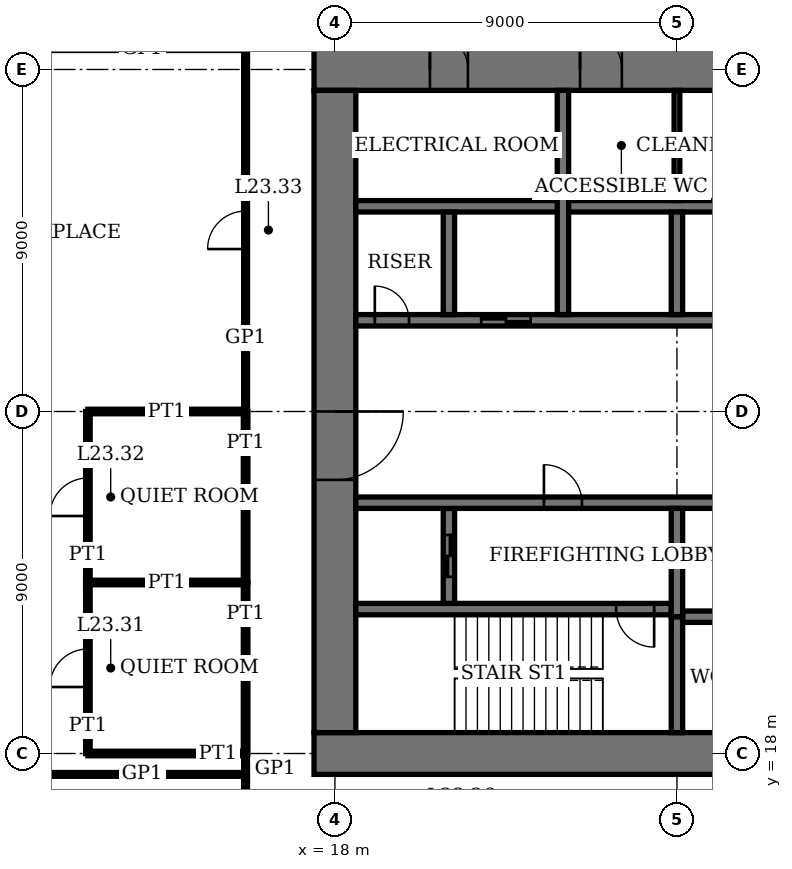
"""IFC4 building model, lengths in metres.
Left out: names, types, materials, properties, quantities, classifications, styles, units other than length and angle.
Written with IfcOpenShell. Run it as: python <this file> out.ifc"""

import sys

from ifc_helpers import new_model, si_unit, direction, frame, frame_2d, origin, place, context, subcontext, project, spatial, rectangle, extrude, element, fill, save


model = new_model("IFC4")
c1 = context("Model", 3, precision=1e-05, world=origin(), true_north=direction((0.0, 1.0)))
c2 = subcontext(c1, "Body", "Model", "MODEL_VIEW")
j1 = project(units=[si_unit("LENGTHUNIT", "METRE"), si_unit("PLANEANGLEUNIT", "RADIAN")], contexts=[c1])
p1 = place(None, origin())
s1 = spatial("IfcSite", under=j1, at=p1, CompositionType="ELEMENT")
p2 = place(p1, origin())
s2 = spatial("IfcBuilding", under=s1, at=p2, CompositionType="ELEMENT")
p3 = place(p2, frame((0.0, 0.0, 97.0)))
s3 = spatial("IfcBuildingStorey", under=s2, at=p3, CompositionType="ELEMENT", Elevation=97.0)
p4 = place(p3, frame((17.45, 18.0, 0.0), z_axis=(0.0, 0.0, 1.0), x_axis=(1.0, 0.0, 0.0)))
e1 = element("IfcWall", 1, at=p4, inside=s3, PredefinedType="SHEAR", context=c2, shape_type="SweptSolid", body=[
    extrude(rectangle(XDim=28.1, YDim=1.1, at=frame_2d((14.05, 0.0))), origin(), (0.0, 0.0, 1.0), 4.0),
])
p5 = place(p4, frame((11.55, 0.0, 0.0)))
e2 = element("IfcOpeningElement", 2, at=p5, cuts=e1, PredefinedType="OPENING", context=c2, shape_type="SweptSolid", body=[
    extrude(rectangle(XDim=1.0, YDim=2.4, at=frame_2d((0.5, 1.2))), frame((0.0, 0.56, 0.0), z_axis=(0.0, -1.0, 0.0), x_axis=(1.0, 0.0, 0.0)), (0.0, 0.0, 1.0), 1.12),
])
p6 = place(p4, frame((16.55, 0.0, 0.0)))
e3 = element("IfcOpeningElement", 3, at=p6, cuts=e1, PredefinedType="OPENING", context=c2, shape_type="SweptSolid", body=[
    extrude(rectangle(XDim=1.0, YDim=2.4, at=frame_2d((0.5, 1.2))), frame((0.0, 0.56, 0.0), z_axis=(0.0, -1.0, 0.0), x_axis=(1.0, 0.0, 0.0)), (0.0, 0.0, 1.0), 1.12),
])
p7 = place(p4, frame((20.0, 0.0, 0.0)))
e4 = element("IfcOpeningElement", 4, at=p7, cuts=e1, PredefinedType="OPENING", context=c2, shape_type="SweptSolid", body=[
    extrude(rectangle(XDim=1.1, YDim=2.4, at=frame_2d((0.55, 1.2))), frame((0.0, 0.56, 0.0), z_axis=(0.0, -1.0, 0.0), x_axis=(1.0, 0.0, 0.0)), (0.0, 0.0, 1.0), 1.12),
])
p8 = place(p4, frame((24.05, 0.0, 0.0)))
e5 = element("IfcOpeningElement", 5, at=p8, cuts=e1, PredefinedType="OPENING", context=c2, shape_type="SweptSolid", body=[
    extrude(rectangle(XDim=1.0, YDim=2.4, at=frame_2d((0.5, 1.2))), frame((0.0, 0.56, 0.0), z_axis=(0.0, -1.0, 0.0), x_axis=(1.0, 0.0, 0.0)), (0.0, 0.0, 1.0), 1.12),
])
p9 = place(p3, frame((45.55, 36.0, 0.0), z_axis=(0.0, 0.0, 1.0), x_axis=(-1.0, 0.0, 0.0)))
e6 = element("IfcWall", 6, at=p9, inside=s3, PredefinedType="SHEAR", context=c2, shape_type="SweptSolid", body=[
    extrude(rectangle(XDim=28.1, YDim=1.1, at=frame_2d((14.05, 0.0))), origin(), (0.0, 0.0, 1.0), 4.0),
])
p10 = place(p9, frame((11.55, 0.0, 0.0)))
e7 = element("IfcOpeningElement", 7, at=p10, cuts=e6, PredefinedType="OPENING", context=c2, shape_type="SweptSolid", body=[
    extrude(rectangle(XDim=1.0, YDim=2.4, at=frame_2d((0.5, 1.2))), frame((0.0, 0.56, 0.0), z_axis=(0.0, -1.0, 0.0), x_axis=(1.0, 0.0, 0.0)), (0.0, 0.0, 1.0), 1.12),
])
p11 = place(p9, frame((16.55, 0.0, 0.0)))
e8 = element("IfcOpeningElement", 8, at=p11, cuts=e6, PredefinedType="OPENING", context=c2, shape_type="SweptSolid", body=[
    extrude(rectangle(XDim=1.0, YDim=2.4, at=frame_2d((0.5, 1.2))), frame((0.0, 0.56, 0.0), z_axis=(0.0, -1.0, 0.0), x_axis=(1.0, 0.0, 0.0)), (0.0, 0.0, 1.0), 1.12),
])
p12 = place(p9, frame((20.0, 0.0, 0.0)))
e9 = element("IfcOpeningElement", 9, at=p12, cuts=e6, PredefinedType="OPENING", context=c2, shape_type="SweptSolid", body=[
    extrude(rectangle(XDim=1.1, YDim=2.4, at=frame_2d((0.55, 1.2))), frame((0.0, 0.56, 0.0), z_axis=(0.0, -1.0, 0.0), x_axis=(1.0, 0.0, 0.0)), (0.0, 0.0, 1.0), 1.12),
])
p13 = place(p9, frame((24.05, 0.0, 0.0)))
e10 = element("IfcOpeningElement", 10, at=p13, cuts=e6, PredefinedType="OPENING", context=c2, shape_type="SweptSolid", body=[
    extrude(rectangle(XDim=1.0, YDim=2.4, at=frame_2d((0.5, 1.2))), frame((0.0, 0.56, 0.0), z_axis=(0.0, -1.0, 0.0), x_axis=(1.0, 0.0, 0.0)), (0.0, 0.0, 1.0), 1.12),
])
p14 = place(p3, frame((18.0, 35.45, 0.0), z_axis=(0.0, 0.0, 1.0), x_axis=(0.0, -1.0, 0.0)))
e11 = element("IfcWall", 11, at=p14, inside=s3, PredefinedType="SHEAR", context=c2, shape_type="SweptSolid", body=[
    extrude(rectangle(XDim=16.9, YDim=1.1, at=frame_2d((8.45, 0.0))), origin(), (0.0, 0.0, 1.0), 4.0),
])
p15 = place(p14, frame((8.45, 0.0, 0.0)))
e12 = element("IfcOpeningElement", 12, at=p15, cuts=e11, PredefinedType="OPENING", context=c2, shape_type="SweptSolid", body=[
    extrude(rectangle(XDim=1.8, YDim=2.4, at=frame_2d((0.9, 1.2))), frame((0.0, 0.56, 0.0), z_axis=(0.0, -1.0, 0.0), x_axis=(1.0, 0.0, 0.0)), (0.0, 0.0, 1.0), 1.12),
])
p16 = place(p3, frame((18.55, 21.8, 0.0), z_axis=(0.0, 0.0, 1.0), x_axis=(1.0, 0.0, 0.0)))
e13 = element("IfcWall", 13, at=p16, inside=s3, PredefinedType="SHEAR", context=c2, shape_type="SweptSolid", body=[
    extrude(rectangle(XDim=8.3, YDim=0.3, at=frame_2d((4.15, 0.0))), origin(), (0.0, 0.0, 1.0), 4.0),
])
p17 = place(p16, frame((6.85, 0.0, 0.0)))
e14 = element("IfcOpeningElement", 14, at=p17, cuts=e13, PredefinedType="OPENING", context=c2, shape_type="SweptSolid", body=[
    extrude(rectangle(XDim=1.0, YDim=2.4, at=frame_2d((0.5, 1.2))), frame((0.0, 0.16, 0.0), z_axis=(0.0, -1.0, 0.0), x_axis=(1.0, 0.0, 0.0)), (0.0, 0.0, 1.0), 0.32),
])
p18 = place(p3, frame((27.0, 18.55, 0.0), z_axis=(0.0, 0.0, 1.0), x_axis=(0.0, 1.0, 0.0)))
e15 = element("IfcWall", 15, at=p18, inside=s3, PredefinedType="SHEAR", context=c2, shape_type="SweptSolid", body=[
    extrude(rectangle(XDim=3.05, YDim=0.3, at=frame_2d((1.525, 0.0))), origin(), (0.0, 0.0, 1.0), 4.0),
])
p19 = place(p3, frame((21.0, 21.95, 0.0), z_axis=(0.0, 0.0, 1.0), x_axis=(0.0, 1.0, 0.0)))
e16 = element("IfcWall", 16, at=p19, inside=s3, PredefinedType="SHEAR", context=c2, shape_type="SweptSolid", body=[
    extrude(rectangle(XDim=2.5, YDim=0.3, at=frame_2d((1.25, 0.0))), origin(), (0.0, 0.0, 1.0), 4.0),
])
p20 = place(p19, frame((0.7, 0.0, 0.0)))
e17 = element("IfcOpeningElement", 17, at=p20, cuts=e16, PredefinedType="OPENING", context=c2, shape_type="SweptSolid", body=[
    extrude(rectangle(XDim=1.1, YDim=2.4, at=frame_2d((0.55, 1.2))), frame((0.0, 0.16, 0.0), z_axis=(0.0, -1.0, 0.0), x_axis=(1.0, 0.0, 0.0)), (0.0, 0.0, 1.0), 0.32),
])
p21 = place(p3, frame((18.55, 24.6, 0.0), z_axis=(0.0, 0.0, 1.0), x_axis=(1.0, 0.0, 0.0)))
e18 = element("IfcWall", 18, at=p21, inside=s3, PredefinedType="SHEAR", context=c2, shape_type="SweptSolid", body=[
    extrude(rectangle(XDim=25.9, YDim=0.3, at=frame_2d((12.95, 0.0))), origin(), (0.0, 0.0, 1.0), 4.0),
])
p22 = place(p21, frame((4.95, 0.0, 0.0)))
e19 = element("IfcOpeningElement", 19, at=p22, cuts=e18, PredefinedType="OPENING", context=c2, shape_type="SweptSolid", body=[
    extrude(rectangle(XDim=1.0, YDim=2.4, at=frame_2d((0.5, 1.2))), frame((0.0, 0.16, 0.0), z_axis=(0.0, -1.0, 0.0), x_axis=(1.0, 0.0, 0.0)), (0.0, 0.0, 1.0), 0.32),
])
p23 = place(p21, frame((24.5, 0.0, 0.0)))
e20 = element("IfcOpeningElement", 20, at=p23, cuts=e18, PredefinedType="OPENING", context=c2, shape_type="SweptSolid", body=[
    extrude(rectangle(XDim=0.9, YDim=2.1, at=frame_2d((0.45, 1.05))), frame((0.0, 0.16, 0.0), z_axis=(0.0, -1.0, 0.0), x_axis=(1.0, 0.0, 0.0)), (0.0, 0.0, 1.0), 0.32),
])
p24 = place(p21, frame((21.3, 0.0, 0.0)))
e21 = element("IfcOpeningElement", 21, at=p24, cuts=e18, PredefinedType="OPENING", context=c2, shape_type="SweptSolid", body=[
    extrude(rectangle(XDim=1.3, YDim=2.4, at=frame_2d((0.65, 1.2))), frame((0.0, 0.16, 0.0), z_axis=(0.0, -1.0, 0.0), x_axis=(1.0, 0.0, 0.0)), (0.0, 0.0, 1.0), 0.32),
])
p25 = place(p3, frame((18.55, 29.4, 0.0), z_axis=(0.0, 0.0, 1.0), x_axis=(1.0, 0.0, 0.0)))
e22 = element("IfcWall", 22, at=p25, inside=s3, PredefinedType="SHEAR", context=c2, shape_type="SweptSolid", body=[
    extrude(rectangle(XDim=25.9, YDim=0.3, at=frame_2d((12.95, 0.0))), origin(), (0.0, 0.0, 1.0), 4.0),
])
p26 = place(p25, frame((19.95, 0.0, 0.0)))
e23 = element("IfcOpeningElement", 23, at=p26, cuts=e22, PredefinedType="OPENING", context=c2, shape_type="SweptSolid", body=[
    extrude(rectangle(XDim=1.0, YDim=2.4, at=frame_2d((0.5, 1.2))), frame((0.0, 0.16, 0.0), z_axis=(0.0, -1.0, 0.0), x_axis=(1.0, 0.0, 0.0)), (0.0, 0.0, 1.0), 0.32),
])
p27 = place(p25, frame((0.5, 0.0, 0.0)))
e24 = element("IfcOpeningElement", 24, at=p27, cuts=e22, PredefinedType="OPENING", context=c2, shape_type="SweptSolid", body=[
    extrude(rectangle(XDim=0.9, YDim=2.1, at=frame_2d((0.45, 1.05))), frame((0.0, 0.16, 0.0), z_axis=(0.0, -1.0, 0.0), x_axis=(1.0, 0.0, 0.0)), (0.0, 0.0, 1.0), 0.32),
])
p28 = place(p25, frame((15.4, 0.0, 0.0)))
e25 = element("IfcOpeningElement", 25, at=p28, cuts=e22, PredefinedType="OPENING", context=c2, shape_type="SweptSolid", body=[
    extrude(rectangle(XDim=1.1, YDim=2.4, at=frame_2d((0.55, 1.2))), frame((0.0, 0.16, 0.0), z_axis=(0.0, -1.0, 0.0), x_axis=(1.0, 0.0, 0.0)), (0.0, 0.0, 1.0), 0.32),
])
p29 = place(p25, frame((12.4, 0.0, 0.0)))
e26 = element("IfcOpeningElement", 26, at=p29, cuts=e22, PredefinedType="OPENING", context=c2, shape_type="SweptSolid", body=[
    extrude(rectangle(XDim=1.1, YDim=2.4, at=frame_2d((0.55, 1.2))), frame((0.0, 0.16, 0.0), z_axis=(0.0, -1.0, 0.0), x_axis=(1.0, 0.0, 0.0)), (0.0, 0.0, 1.0), 0.32),
])
p30 = place(p25, frame((3.3, 0.0, 0.0)))
e27 = element("IfcOpeningElement", 27, at=p30, cuts=e22, PredefinedType="OPENING", context=c2, shape_type="SweptSolid", body=[
    extrude(rectangle(XDim=1.3, YDim=2.4, at=frame_2d((0.65, 1.2))), frame((0.0, 0.16, 0.0), z_axis=(0.0, -1.0, 0.0), x_axis=(1.0, 0.0, 0.0)), (0.0, 0.0, 1.0), 0.32),
])
for number, where, z_axis, x_axis in (
    (28, (27.15, 21.6, 0.0), (0.0, 0.0, 1.0), (1.0, 0.0, 0.0)),
    (29, (18.55, 32.4, 0.0), (0.0, 0.0, 1.0), (1.0, 0.0, 0.0)),
):
    element("IfcWall", number, at=place(p3, frame(where, z_axis=z_axis, x_axis=x_axis)), inside=s3, PredefinedType="SHEAR", context=c2, shape_type="SweptSolid", body=[
        extrude(rectangle(XDim=17.3, YDim=0.3, at=frame_2d((8.65, 0.0))), origin(), (0.0, 0.0, 1.0), 4.0),
    ])
p31 = place(p3, frame((27.0, 29.55, 0.0), z_axis=(0.0, 0.0, 1.0), x_axis=(0.0, 1.0, 0.0)))
e30 = element("IfcWall", 30, at=p31, inside=s3, PredefinedType="SHEAR", context=c2, shape_type="SweptSolid", body=[
    extrude(rectangle(XDim=2.7, YDim=0.3, at=frame_2d((1.35, 0.0))), origin(), (0.0, 0.0, 1.0), 4.0),
])
p32 = place(p3, frame((24.0, 29.55, 0.0), z_axis=(0.0, 0.0, 1.0), x_axis=(0.0, 1.0, 0.0)))
e31 = element("IfcWall", 31, at=p32, inside=s3, PredefinedType="SHEAR", context=c2, shape_type="SweptSolid", body=[
    extrude(rectangle(XDim=5.9, YDim=0.3, at=frame_2d((2.95, 0.0))), origin(), (0.0, 0.0, 1.0), 4.0),
])
p33 = place(p3, frame((21.0, 29.55, 0.0), z_axis=(0.0, 0.0, 1.0), x_axis=(0.0, 1.0, 0.0)))
e32 = element("IfcWall", 32, at=p33, inside=s3, PredefinedType="SHEAR", context=c2, shape_type="SweptSolid", body=[
    extrude(rectangle(XDim=2.7, YDim=0.3, at=frame_2d((1.35, 0.0))), origin(), (0.0, 0.0, 1.0), 4.0),
])
p34 = place(p3, frame((27.0, 21.6, 0.0), z_axis=(0.0, 0.0, 1.0), x_axis=(0.0, 1.0, 0.0)))
e33 = element("IfcWall", 33, at=p34, inside=s3, PredefinedType="SHEAR", context=c2, shape_type="SweptSolid", body=[
    extrude(rectangle(XDim=2.85, YDim=0.3, at=frame_2d((1.425, 0.0))), origin(), (0.0, 0.0, 1.0), 4.0),
])
p35 = place(p3, frame((10.0, 17.45, 0.0), z_axis=(0.0, 0.0, 1.0), x_axis=(1.0, 0.0, 0.0)))
e34 = element("IfcWall", 34, at=p35, inside=s3, PredefinedType="PARTITIONING", context=c2, shape_type="SweptSolid", body=[
    extrude(rectangle(XDim=5.65, YDim=0.1, at=frame_2d((2.825, 0.0))), origin(), (0.0, 0.0, 1.0), 3.75),
])
p36 = place(p3, frame((11.5, 18.0, 0.0), z_axis=(0.0, 0.0, 1.0), x_axis=(1.0, 0.0, 0.0)))
e35 = element("IfcWall", 35, at=p36, inside=s3, PredefinedType="PARTITIONING", context=c2, shape_type="SweptSolid", body=[
    extrude(rectangle(XDim=4.15, YDim=0.12, at=frame_2d((2.075, 0.0))), origin(), (0.0, 0.0, 1.0), 3.05),
])
p37 = place(p3, frame((11.5, 22.5, 0.0), z_axis=(0.0, 0.0, 1.0), x_axis=(1.0, 0.0, 0.0)))
e36 = element("IfcWall", 36, at=p37, inside=s3, PredefinedType="PARTITIONING", context=c2, shape_type="SweptSolid", body=[
    extrude(rectangle(XDim=4.15, YDim=0.12, at=frame_2d((2.075, 0.0))), origin(), (0.0, 0.0, 1.0), 3.1),
])
p38 = place(p3, frame((11.5, 27.0, 0.0), z_axis=(0.0, 0.0, 1.0), x_axis=(1.0, 0.0, 0.0)))
e37 = element("IfcWall", 37, at=p38, inside=s3, PredefinedType="PARTITIONING", context=c2, shape_type="SweptSolid", body=[
    extrude(rectangle(XDim=4.15, YDim=0.12, at=frame_2d((2.075, 0.0))), origin(), (0.0, 0.0, 1.0), 3.05),
])
p39 = place(p3, frame((11.5, 18.0, 0.0), z_axis=(0.0, 0.0, 1.0), x_axis=(0.0, 1.0, 0.0)))
e38 = element("IfcWall", 38, at=p39, inside=s3, PredefinedType="PARTITIONING", context=c2, shape_type="SweptSolid", body=[
    extrude(rectangle(XDim=4.5, YDim=0.12, at=frame_2d((2.25, 0.0))), origin(), (0.0, 0.0, 1.0), 3.75),
])
p40 = place(p39, frame((1.75, 0.0, 0.0)))
e39 = element("IfcOpeningElement", 39, at=p40, cuts=e38, PredefinedType="OPENING", context=c2, shape_type="SweptSolid", body=[
    extrude(rectangle(XDim=1.0, YDim=2.4, at=frame_2d((0.5, 1.2))), frame((0.0, 0.07, 0.0), z_axis=(0.0, -1.0, 0.0), x_axis=(1.0, 0.0, 0.0)), (0.0, 0.0, 1.0), 0.14),
])
p41 = place(p3, frame((11.5, 22.5, 0.0), z_axis=(0.0, 0.0, 1.0), x_axis=(0.0, 1.0, 0.0)))
e40 = element("IfcWall", 40, at=p41, inside=s3, PredefinedType="PARTITIONING", context=c2, shape_type="SweptSolid", body=[
    extrude(rectangle(XDim=4.5, YDim=0.12, at=frame_2d((2.25, 0.0))), origin(), (0.0, 0.0, 1.0), 3.75),
])
p42 = place(p41, frame((1.75, 0.0, 0.0)))
e41 = element("IfcOpeningElement", 41, at=p42, cuts=e40, PredefinedType="OPENING", context=c2, shape_type="SweptSolid", body=[
    extrude(rectangle(XDim=1.0, YDim=2.4, at=frame_2d((0.5, 1.2))), frame((0.0, 0.07, 0.0), z_axis=(0.0, -1.0, 0.0), x_axis=(1.0, 0.0, 0.0)), (0.0, 0.0, 1.0), 0.14),
])
for number, where, z_axis, x_axis in (
    (42, (15.65, 18.0, 0.0), (0.0, 0.0, 1.0), (0.0, 1.0, 0.0)),
    (43, (15.65, 22.5, 0.0), (0.0, 0.0, 1.0), (0.0, 1.0, 0.0)),
):
    element("IfcWall", number, at=place(p3, frame(where, z_axis=z_axis, x_axis=x_axis)), inside=s3, PredefinedType="PARTITIONING", context=c2, shape_type="SweptSolid", body=[
        extrude(rectangle(XDim=4.5, YDim=0.12, at=frame_2d((2.25, 0.0))), origin(), (0.0, 0.0, 1.0), 3.75),
    ])
p43 = place(p3, frame((15.65, 15.65, 0.0), z_axis=(0.0, 0.0, 1.0), x_axis=(0.0, 1.0, 0.0)))
e44 = element("IfcWall", 44, at=p43, inside=s3, PredefinedType="PARTITIONING", context=c2, shape_type="SweptSolid", body=[
    extrude(rectangle(XDim=2.35, YDim=0.1, at=frame_2d((1.175, 0.0))), origin(), (0.0, 0.0, 1.0), 3.75),
])
p44 = place(p3, frame((15.65, 27.0, 0.0), z_axis=(0.0, 0.0, 1.0), x_axis=(0.0, 1.0, 0.0)))
e45 = element("IfcWall", 45, at=p44, inside=s3, PredefinedType="PARTITIONING", context=c2, shape_type="SweptSolid", body=[
    extrude(rectangle(XDim=9.55, YDim=0.1, at=frame_2d((4.775, 0.0))), origin(), (0.0, 0.0, 1.0), 3.75),
])
p45 = place(p44, frame((4.275, 0.0, 0.0)))
e46 = element("IfcOpeningElement", 46, at=p45, cuts=e45, PredefinedType="OPENING", context=c2, shape_type="SweptSolid", body=[
    extrude(rectangle(XDim=1.0, YDim=2.4, at=frame_2d((0.5, 1.2))), frame((0.0, 0.06, 0.0), z_axis=(0.0, -1.0, 0.0), x_axis=(1.0, 0.0, 0.0)), (0.0, 0.0, 1.0), 0.12),
])
p46 = place(p3, frame((27.0, 32.55, 0.0), z_axis=(0.0, 0.0, 1.0), x_axis=(0.0, 1.0, 0.0)))
e47 = element("IfcWall", 47, at=p46, inside=s3, PredefinedType="PARTITIONING", context=c2, shape_type="SweptSolid", body=[
    extrude(rectangle(XDim=2.9, YDim=0.15, at=frame_2d((1.45, 0.0))), origin(), (0.0, 0.0, 1.0), 3.75),
])
p47 = place(p15, origin())
e48 = element("IfcDoor", 48, at=p47, inside=s3, OperationType="DOUBLE_DOOR_DOUBLE_SWING", PredefinedType="DOOR", context=c2, shape_type="SweptSolid", body=[
    extrude(rectangle(XDim=1.8, YDim=2.4, at=frame_2d((0.9, 1.2))), frame((0.0, 0.03, 0.0), z_axis=(0.0, -1.0, 0.0), x_axis=(1.0, 0.0, 0.0)), (0.0, 0.0, 1.0), 0.06),
    extrude(rectangle(XDim=0.04, YDim=2.4, at=frame_2d((0.02, 1.2))), frame((0.0, 0.55, 0.0), z_axis=(0.0, -1.0, 0.0), x_axis=(1.0, 0.0, 0.0)), (0.0, 0.0, 1.0), 1.1),
    extrude(rectangle(XDim=0.04, YDim=2.4, at=frame_2d((1.78, 1.2))), frame((0.0, 0.55, 0.0), z_axis=(0.0, -1.0, 0.0), x_axis=(1.0, 0.0, 0.0)), (0.0, 0.0, 1.0), 1.1),
    extrude(rectangle(XDim=1.8, YDim=0.04, at=frame_2d((0.9, 2.38))), frame((0.0, 0.55, 0.0), z_axis=(0.0, -1.0, 0.0), x_axis=(1.0, 0.0, 0.0)), (0.0, 0.0, 1.0), 1.1),
])
fill(e12, e48)
p48 = place(p12, origin())
e49 = element("IfcDoor", 49, at=p48, inside=s3, OperationType="SINGLE_SWING_RIGHT", PredefinedType="DOOR", context=c2, shape_type="SweptSolid", body=[
    extrude(rectangle(XDim=1.1, YDim=2.4, at=frame_2d((0.55, 1.2))), frame((0.0, 0.025, 0.0), z_axis=(0.0, -1.0, 0.0), x_axis=(1.0, 0.0, 0.0)), (0.0, 0.0, 1.0), 0.05),
    extrude(rectangle(XDim=0.04, YDim=2.4, at=frame_2d((0.02, 1.2))), frame((0.0, 0.44, 0.0), z_axis=(0.0, -1.0, 0.0), x_axis=(1.0, 0.0, 0.0)), (0.0, 0.0, 1.0), 0.88),
    extrude(rectangle(XDim=0.04, YDim=2.4, at=frame_2d((1.08, 1.2))), frame((0.0, 0.44, 0.0), z_axis=(0.0, -1.0, 0.0), x_axis=(1.0, 0.0, 0.0)), (0.0, 0.0, 1.0), 0.88),
    extrude(rectangle(XDim=1.1, YDim=0.04, at=frame_2d((0.55, 2.38))), frame((0.0, 0.44, 0.0), z_axis=(0.0, -1.0, 0.0), x_axis=(1.0, 0.0, 0.0)), (0.0, 0.0, 1.0), 0.88),
])
fill(e9, e49)
p49 = place(p13, origin())
e50 = element("IfcDoor", 50, at=p49, inside=s3, OperationType="SINGLE_SWING_RIGHT", PredefinedType="DOOR", context=c2, shape_type="SweptSolid", body=[
    extrude(rectangle(XDim=1.0, YDim=2.4, at=frame_2d((0.5, 1.2))), frame((0.0, 0.025, 0.0), z_axis=(0.0, -1.0, 0.0), x_axis=(1.0, 0.0, 0.0)), (0.0, 0.0, 1.0), 0.05),
    extrude(rectangle(XDim=0.04, YDim=2.4, at=frame_2d((0.02, 1.2))), frame((0.0, 0.4, 0.0), z_axis=(0.0, -1.0, 0.0), x_axis=(1.0, 0.0, 0.0)), (0.0, 0.0, 1.0), 0.8),
    extrude(rectangle(XDim=0.04, YDim=2.4, at=frame_2d((0.98, 1.2))), frame((0.0, 0.4, 0.0), z_axis=(0.0, -1.0, 0.0), x_axis=(1.0, 0.0, 0.0)), (0.0, 0.0, 1.0), 0.8),
    extrude(rectangle(XDim=1.0, YDim=0.04, at=frame_2d((0.5, 2.38))), frame((0.0, 0.4, 0.0), z_axis=(0.0, -1.0, 0.0), x_axis=(1.0, 0.0, 0.0)), (0.0, 0.0, 1.0), 0.8),
])
fill(e10, e50)
p50 = place(p17, origin())
e51 = element("IfcDoor", 51, at=p50, inside=s3, OperationType="SINGLE_SWING_RIGHT", PredefinedType="DOOR", context=c2, shape_type="SweptSolid", body=[
    extrude(rectangle(XDim=1.0, YDim=2.4, at=frame_2d((0.5, 1.2))), frame((0.0, 0.03, 0.0), z_axis=(0.0, -1.0, 0.0), x_axis=(1.0, 0.0, 0.0)), (0.0, 0.0, 1.0), 0.06),
])
fill(e14, e51)
p51 = place(p22, origin())
e52 = element("IfcDoor", 52, at=p51, inside=s3, OperationType="SINGLE_SWING_RIGHT", PredefinedType="DOOR", context=c2, shape_type="SweptSolid", body=[
    extrude(rectangle(XDim=1.0, YDim=2.4, at=frame_2d((0.5, 1.2))), frame((0.0, 0.03, 0.0), z_axis=(0.0, -1.0, 0.0), x_axis=(1.0, 0.0, 0.0)), (0.0, 0.0, 1.0), 0.06),
])
fill(e19, e52)
p52 = place(p27, origin())
e53 = element("IfcDoor", 53, at=p52, inside=s3, OperationType="SINGLE_SWING_RIGHT", PredefinedType="DOOR", context=c2, shape_type="SweptSolid", body=[
    extrude(rectangle(XDim=0.9, YDim=2.1, at=frame_2d((0.45, 1.05))), frame((0.0, 0.03, 0.0), z_axis=(0.0, -1.0, 0.0), x_axis=(1.0, 0.0, 0.0)), (0.0, 0.0, 1.0), 0.06),
])
fill(e24, e53)
p53 = place(p40, origin())
e54 = element("IfcDoor", 54, at=p53, inside=s3, OperationType="SINGLE_SWING_RIGHT", PredefinedType="DOOR", context=c2, shape_type="SweptSolid", body=[
    extrude(rectangle(XDim=1.0, YDim=2.4, at=frame_2d((0.5, 1.2))), frame((0.0, 0.025, 0.0), z_axis=(0.0, -1.0, 0.0), x_axis=(1.0, 0.0, 0.0)), (0.0, 0.0, 1.0), 0.05),
])
fill(e39, e54)
p54 = place(p42, origin())
e55 = element("IfcDoor", 55, at=p54, inside=s3, OperationType="SINGLE_SWING_RIGHT", PredefinedType="DOOR", context=c2, shape_type="SweptSolid", body=[
    extrude(rectangle(XDim=1.0, YDim=2.4, at=frame_2d((0.5, 1.2))), frame((0.0, 0.025, 0.0), z_axis=(0.0, -1.0, 0.0), x_axis=(1.0, 0.0, 0.0)), (0.0, 0.0, 1.0), 0.05),
])
fill(e41, e55)
p55 = place(p45, origin())
e56 = element("IfcDoor", 56, at=p55, inside=s3, OperationType="SINGLE_SWING_RIGHT", PredefinedType="DOOR", context=c2, shape_type="SweptSolid", body=[
    extrude(rectangle(XDim=1.0, YDim=2.4, at=frame_2d((0.5, 1.2))), frame((0.0, 0.02, 0.0), z_axis=(0.0, -1.0, 0.0), x_axis=(1.0, 0.0, 0.0)), (0.0, 0.0, 1.0), 0.04),
])
fill(e46, e56)
p56 = place(p30, origin())
e57 = element("IfcDoor", 57, at=p56, inside=s3, OperationType="DOUBLE_DOOR_SLIDING", PredefinedType="DOOR", context=c2, shape_type="SweptSolid", body=[
    extrude(rectangle(XDim=1.3, YDim=2.4, at=frame_2d((0.65, 1.2))), frame((0.0, 0.02, 0.0), z_axis=(0.0, -1.0, 0.0), x_axis=(1.0, 0.0, 0.0)), (0.0, 0.0, 1.0), 0.04),
])
fill(e27, e57)
p57 = place(p20, origin())
e58 = element("IfcDoor", 58, at=p57, inside=s3, OperationType="DOUBLE_DOOR_SLIDING", PredefinedType="DOOR", context=c2, shape_type="SweptSolid", body=[
    extrude(rectangle(XDim=1.1, YDim=2.4, at=frame_2d((0.55, 1.2))), frame((0.0, 0.03, 0.0), z_axis=(0.0, -1.0, 0.0), x_axis=(1.0, 0.0, 0.0)), (0.0, 0.0, 1.0), 0.06),
])
fill(e17, e58)
save(model, sys.argv[1])
